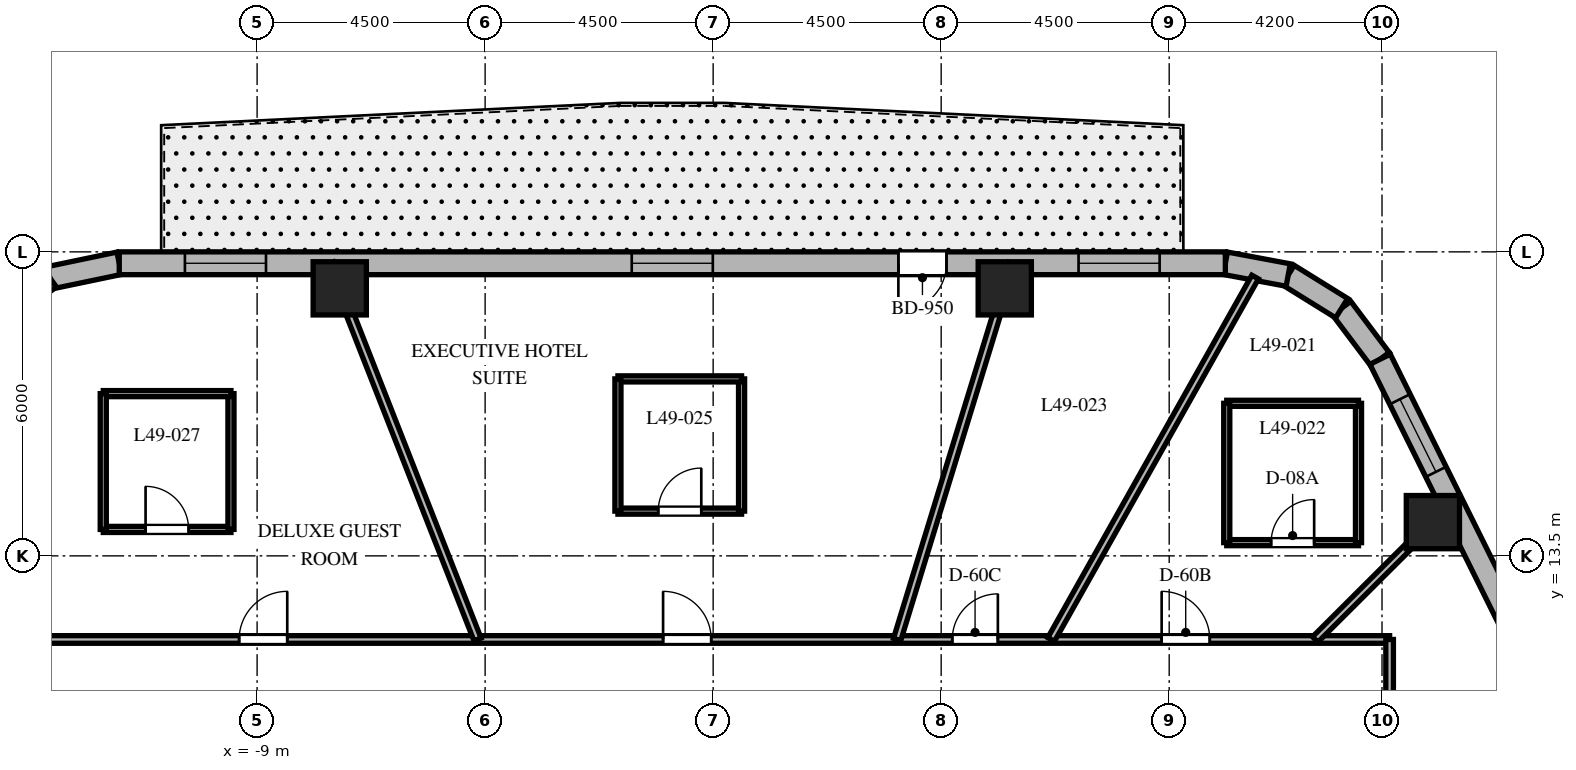
"""IFC4 building model, lengths in metres.
Left out: names, types, materials, properties, quantities, classifications, styles, units other than length and angle.
Written with IfcOpenShell. Run it as: python <this file> out.ifc"""

import sys

from ifc_helpers import new_model, si_unit, direction, frame, frame_2d, origin, origin_2d, place, context, subcontext, project, spatial, rectangle, extrude, element, fill, save


model = new_model("IFC4")
c1 = context("Model", 3, precision=1e-05, world=origin(), true_north=direction((0.0, 1.0)))
c2 = subcontext(c1, "Body", "Model", "MODEL_VIEW")
j1 = project(units=[si_unit("LENGTHUNIT", "METRE"), si_unit("PLANEANGLEUNIT", "RADIAN")], contexts=[c1])
p1 = place(None, origin())
s1 = spatial("IfcSite", under=j1, at=p1, CompositionType="ELEMENT")
p2 = place(p1, origin())
s2 = spatial("IfcBuilding", under=s1, at=p2, CompositionType="ELEMENT")
p3 = place(p2, frame((0.0, 0.0, 197.8)))
s3 = spatial("IfcBuildingStorey", under=s2, at=p3, CompositionType="ELEMENT", Elevation=197.8)
for number, where, z_axis, x_axis in (
    (1, (14.204, 14.166, 0.0), (0.0, 0.0, 1.0), (1.0, 0.0, 0.0)),
    (2, (5.755, 18.78, 0.0), (0.0, 0.0, 1.0), (1.0, 0.0, 0.0)),
    (3, (-7.369, 18.78, 0.0), (0.0, 0.0, 1.0), (1.0, 0.0, 0.0)),
):
    element("IfcColumn", number, at=place(p3, frame(where, z_axis=z_axis, x_axis=x_axis)), inside=s3, PredefinedType="COLUMN", context=c2, shape_type="SweptSolid", body=[
        extrude(rectangle(XDim=1.05, YDim=1.05, at=origin_2d()), origin(), (0.0, 0.0, 1.0), 3.7),
    ])
p4 = place(p3, frame((13.162, 17.381, 0.0), z_axis=(0.0, 0.0, 1.0), x_axis=(-0.601515770517, 0.798860925205, 0.0)))
e4 = element("IfcWall", 4, at=p4, inside=s3, PredefinedType="SOLIDWALL", context=c2, shape_type="SweptSolid", body=[
    extrude(rectangle(XDim=1.262, YDim=0.45, at=frame_2d((0.631, 0.0))), origin(), (0.0, 0.0, 1.0), 3.35),
])
p5 = place(p3, frame((12.403, 18.389, 0.0), z_axis=(0.0, 0.0, 1.0), x_axis=(-0.849795170926, 0.527113049991, 0.0)))
e5 = element("IfcWall", 5, at=p5, inside=s3, PredefinedType="SOLIDWALL", context=c2, shape_type="SweptSolid", body=[
    extrude(rectangle(XDim=1.241, YDim=0.45, at=frame_2d((0.62, 0.0))), origin(), (0.0, 0.0, 1.0), 3.35),
])
p6 = place(p3, frame((11.349, 19.043, 0.0), z_axis=(0.0, 0.0, 1.0), x_axis=(-0.982931267051, 0.183973161772, 0.0)))
e6 = element("IfcWall", 6, at=p6, inside=s3, PredefinedType="SOLIDWALL", context=c2, shape_type="SweptSolid", body=[
    extrude(rectangle(XDim=1.262, YDim=0.45, at=frame_2d((0.631, 0.0))), origin(), (0.0, 0.0, 1.0), 3.35),
])
p7 = place(p3, frame((-11.72, 19.275, 0.0), z_axis=(0.0, 0.0, 1.0), x_axis=(-0.97893106758, -0.204191001093, 0.0)))
e7 = element("IfcWall", 7, at=p7, inside=s3, PredefinedType="SOLIDWALL", context=c2, shape_type="SweptSolid", body=[
    extrude(rectangle(XDim=1.4, YDim=0.45, at=frame_2d((0.7, 0.0))), origin(), (0.0, 0.0, 1.0), 3.35),
])
p8 = place(p3, frame((-13.091, 18.989, 0.0), z_axis=(0.0, 0.0, 1.0), x_axis=(-0.815574637848, -0.578651890258, 0.0)))
e8 = element("IfcWall", 8, at=p8, inside=s3, PredefinedType="SOLIDWALL", context=c2, shape_type="SweptSolid", body=[
    extrude(rectangle(XDim=1.377, YDim=0.45, at=frame_2d((0.688, 0.0))), origin(), (0.0, 0.0, 1.0), 3.35),
])
p9 = place(p3, frame((20.618, 2.344, 0.0), z_axis=(0.0, 0.0, 1.0), x_axis=(-0.444243691097, 0.895905990002, 0.0)))
e9 = element("IfcWall", 9, at=p9, inside=s3, PredefinedType="SOLIDWALL", context=c2, shape_type="SweptSolid", body=[
    extrude(rectangle(XDim=16.784, YDim=0.45, at=frame_2d((8.392, 0.0))), origin(), (0.0, 0.0, 1.0), 3.35),
])
p10 = place(p9, frame((0.931, 0.0, 0.8)))
e10 = element("IfcOpeningElement", 10, at=p10, cuts=e9, PredefinedType="OPENING", context=c2, shape_type="SweptSolid", body=[
    extrude(rectangle(XDim=1.6, YDim=1.75, at=frame_2d((0.8, 0.875))), frame((0.0, 0.235, 0.0), z_axis=(0.0, -1.0, 0.0), x_axis=(1.0, 0.0, 0.0)), (0.0, 0.0, 1.0), 0.47),
])
p11 = place(p9, frame((7.642, 0.0, 0.8)))
e11 = element("IfcOpeningElement", 11, at=p11, cuts=e9, PredefinedType="OPENING", context=c2, shape_type="SweptSolid", body=[
    extrude(rectangle(XDim=1.6, YDim=1.75, at=frame_2d((0.8, 0.875))), frame((0.0, 0.235, 0.0), z_axis=(0.0, -1.0, 0.0), x_axis=(1.0, 0.0, 0.0)), (0.0, 0.0, 1.0), 0.47),
])
p12 = place(p9, frame((14.303, 0.0, 0.8)))
e12 = element("IfcOpeningElement", 12, at=p12, cuts=e9, PredefinedType="OPENING", context=c2, shape_type="SweptSolid", body=[
    extrude(rectangle(XDim=1.6, YDim=1.75, at=frame_2d((0.8, 0.875))), frame((0.0, 0.235, 0.0), z_axis=(0.0, -1.0, 0.0), x_axis=(1.0, 0.0, 0.0)), (0.0, 0.0, 1.0), 0.47),
])
p13 = place(p3, frame((10.108, 19.275, 0.0), z_axis=(0.0, 0.0, 1.0), x_axis=(-1.0, 0.0, 0.0)))
e13 = element("IfcWall", 13, at=p13, inside=s3, PredefinedType="SOLIDWALL", context=c2, shape_type="SweptSolid", body=[
    extrude(rectangle(XDim=21.829, YDim=0.45, at=frame_2d((10.915, 0.0))), origin(), (0.0, 0.0, 1.0), 3.35),
])
p14 = place(p13, frame((5.503, 0.0, 0.0)))
e14 = element("IfcOpeningElement", 14, at=p14, cuts=e13, PredefinedType="OPENING", context=c2, shape_type="SweptSolid", body=[
    extrude(rectangle(XDim=0.95, YDim=2.15, at=frame_2d((0.475, 1.075))), frame((0.0, 0.235, 0.0), z_axis=(0.0, -1.0, 0.0), x_axis=(1.0, 0.0, 0.0)), (0.0, 0.0, 1.0), 0.47),
])
p15 = place(p13, frame((1.297, 0.0, 0.8)))
e15 = element("IfcOpeningElement", 15, at=p15, cuts=e13, PredefinedType="OPENING", context=c2, shape_type="SweptSolid", body=[
    extrude(rectangle(XDim=1.6, YDim=1.75, at=frame_2d((0.8, 0.875))), frame((0.0, 0.235, 0.0), z_axis=(0.0, -1.0, 0.0), x_axis=(1.0, 0.0, 0.0)), (0.0, 0.0, 1.0), 0.47),
])
p16 = place(p13, frame((10.115, 0.0, 0.8)))
e16 = element("IfcOpeningElement", 16, at=p16, cuts=e13, PredefinedType="OPENING", context=c2, shape_type="SweptSolid", body=[
    extrude(rectangle(XDim=1.6, YDim=1.75, at=frame_2d((0.8, 0.875))), frame((0.0, 0.235, 0.0), z_axis=(0.0, -1.0, 0.0), x_axis=(1.0, 0.0, 0.0)), (0.0, 0.0, 1.0), 0.47),
])
p17 = place(p13, frame((18.933, 0.0, 0.8)))
e17 = element("IfcOpeningElement", 17, at=p17, cuts=e13, PredefinedType="OPENING", context=c2, shape_type="SweptSolid", body=[
    extrude(rectangle(XDim=1.6, YDim=1.75, at=frame_2d((0.8, 0.875))), frame((0.0, 0.235, 0.0), z_axis=(0.0, -1.0, 0.0), x_axis=(1.0, 0.0, 0.0)), (0.0, 0.0, 1.0), 0.47),
])
p18 = place(p3, frame((-13.35, 11.85, 0.0), z_axis=(0.0, 0.0, 1.0), x_axis=(1.0, 0.0, 0.0)))
e18 = element("IfcWall", 18, at=p18, inside=s3, PredefinedType="PARTITIONING", context=c2, shape_type="SweptSolid", body=[
    extrude(rectangle(XDim=26.7, YDim=0.15, at=frame_2d((13.35, 0.0))), origin(), (0.0, 0.0, 1.0), 2.79),
])
p19 = place(p18, frame((22.201, 0.0, 0.0)))
e19 = element("IfcOpeningElement", 19, at=p19, cuts=e18, PredefinedType="OPENING", context=c2, shape_type="SweptSolid", body=[
    extrude(rectangle(XDim=0.95, YDim=2.03, at=frame_2d((0.475, 1.015))), frame((0.0, 0.085, 0.0), z_axis=(0.0, -1.0, 0.0), x_axis=(1.0, 0.0, 0.0)), (0.0, 0.0, 1.0), 0.17),
])
p20 = place(p18, frame((18.069, 0.0, 0.0)))
e20 = element("IfcOpeningElement", 20, at=p20, cuts=e18, PredefinedType="OPENING", context=c2, shape_type="SweptSolid", body=[
    extrude(rectangle(XDim=0.9, YDim=2.03, at=frame_2d((0.45, 1.015))), frame((0.0, 0.085, 0.0), z_axis=(0.0, -1.0, 0.0), x_axis=(1.0, 0.0, 0.0)), (0.0, 0.0, 1.0), 0.17),
])
p21 = place(p18, frame((12.362, 0.0, 0.0)))
e21 = element("IfcOpeningElement", 21, at=p21, cuts=e18, PredefinedType="OPENING", context=c2, shape_type="SweptSolid", body=[
    extrude(rectangle(XDim=0.95, YDim=2.03, at=frame_2d((0.475, 1.015))), frame((0.0, 0.085, 0.0), z_axis=(0.0, -1.0, 0.0), x_axis=(1.0, 0.0, 0.0)), (0.0, 0.0, 1.0), 0.17),
])
p22 = place(p18, frame((3.995, 0.0, 0.0)))
e22 = element("IfcOpeningElement", 22, at=p22, cuts=e18, PredefinedType="OPENING", context=c2, shape_type="SweptSolid", body=[
    extrude(rectangle(XDim=0.95, YDim=2.03, at=frame_2d((0.475, 1.015))), frame((0.0, 0.085, 0.0), z_axis=(0.0, -1.0, 0.0), x_axis=(1.0, 0.0, 0.0)), (0.0, 0.0, 1.0), 0.17),
])
p23 = place(p3, frame((13.35, 11.85, 0.0), z_axis=(0.0, 0.0, 1.0), x_axis=(0.0, -1.0, 0.0)))
e23 = element("IfcWall", 23, at=p23, inside=s3, PredefinedType="PARTITIONING", context=c2, shape_type="SweptSolid", body=[
    extrude(rectangle(XDim=23.7, YDim=0.15, at=frame_2d((11.85, 0.0))), origin(), (0.0, 0.0, 1.0), 2.79),
])
p24 = place(p23, frame((9.424, 0.0, 0.0)))
e24 = element("IfcOpeningElement", 24, at=p24, cuts=e23, PredefinedType="OPENING", context=c2, shape_type="SweptSolid", body=[
    extrude(rectangle(XDim=0.95, YDim=2.03, at=frame_2d((0.475, 1.015))), frame((0.0, 0.085, 0.0), z_axis=(0.0, -1.0, 0.0), x_axis=(1.0, 0.0, 0.0)), (0.0, 0.0, 1.0), 0.17),
])
p25 = place(p23, frame((3.765, 0.0, 0.0)))
e25 = element("IfcOpeningElement", 25, at=p25, cuts=e23, PredefinedType="OPENING", context=c2, shape_type="SweptSolid", body=[
    extrude(rectangle(XDim=0.9, YDim=2.03, at=frame_2d((0.45, 1.015))), frame((0.0, 0.085, 0.0), z_axis=(0.0, -1.0, 0.0), x_axis=(1.0, 0.0, 0.0)), (0.0, 0.0, 1.0), 0.17),
])
p26 = place(p23, frame((12.494, 0.0, 0.0)))
e26 = element("IfcOpeningElement", 26, at=p26, cuts=e23, PredefinedType="OPENING", context=c2, shape_type="SweptSolid", body=[
    extrude(rectangle(XDim=0.9, YDim=2.03, at=frame_2d((0.45, 1.015))), frame((0.0, 0.085, 0.0), z_axis=(0.0, -1.0, 0.0), x_axis=(1.0, 0.0, 0.0)), (0.0, 0.0, 1.0), 0.17),
])
p27 = place(p3, frame((11.882, 11.85, 0.0), z_axis=(0.0, 0.0, 1.0), x_axis=(0.708037373639, 0.706174962407, 0.0)))
e27 = element("IfcWall", 27, at=p27, inside=s3, PredefinedType="PARTITIONING", context=c2, shape_type="SweptSolid", body=[
    extrude(rectangle(XDim=3.802, YDim=0.15, at=frame_2d((1.901, 0.0))), origin(), (0.0, 0.0, 1.0), 2.59),
])
p28 = place(p3, frame((6.67, 11.85, 0.0), z_axis=(0.0, 0.0, 1.0), x_axis=(0.490522493943, 0.871428530022, 0.0)))
e28 = element("IfcWall", 28, at=p28, inside=s3, PredefinedType="PARTITIONING", context=c2, shape_type="SweptSolid", body=[
    extrude(rectangle(XDim=8.207, YDim=0.15, at=frame_2d((4.104, 0.0))), origin(), (0.0, 0.0, 1.0), 2.59),
])
p29 = place(p3, frame((3.631, 11.85, 0.0), z_axis=(0.0, 0.0, 1.0), x_axis=(0.293007573338, 0.956110120209, 0.0)))
e29 = element("IfcWall", 29, at=p29, inside=s3, PredefinedType="PARTITIONING", context=c2, shape_type="SweptSolid", body=[
    extrude(rectangle(XDim=7.766, YDim=0.15, at=frame_2d((3.883, 0.0))), origin(), (0.0, 0.0, 1.0), 2.59),
])
p30 = place(p3, frame((-4.65, 11.85, 0.0), z_axis=(0.0, 0.0, 1.0), x_axis=(-0.365265947993, 0.930903210456, 0.0)))
e30 = element("IfcWall", 30, at=p30, inside=s3, PredefinedType="PARTITIONING", context=c2, shape_type="SweptSolid", body=[
    extrude(rectangle(XDim=7.976, YDim=0.15, at=frame_2d((3.988, 0.0))), origin(), (0.0, 0.0, 1.0), 2.59),
])
p31 = place(p3, frame((10.136, 13.761, 0.0), z_axis=(0.0, 0.0, 1.0), x_axis=(1.0, 0.0, 0.0)))
e31 = element("IfcWall", 31, at=p31, inside=s3, PredefinedType="PARTITIONING", context=c2, shape_type="SweptSolid", body=[
    extrude(rectangle(XDim=2.6, YDim=0.12, at=frame_2d((1.3, 0.0))), origin(), (0.0, 0.0, 1.0), 3.35),
])
p32 = place(p31, frame((0.875, 0.0, 0.0)))
e32 = element("IfcOpeningElement", 32, at=p32, cuts=e31, PredefinedType="OPENING", context=c2, shape_type="SweptSolid", body=[
    extrude(rectangle(XDim=0.85, YDim=2.03, at=frame_2d((0.425, 1.015))), frame((0.0, 0.07, 0.0), z_axis=(0.0, -1.0, 0.0), x_axis=(1.0, 0.0, 0.0)), (0.0, 0.0, 1.0), 0.14),
])
p33 = place(p3, frame((12.736, 13.761, 0.0), z_axis=(0.0, 0.0, 1.0), x_axis=(0.0, 1.0, 0.0)))
e33 = element("IfcWall", 33, at=p33, inside=s3, PredefinedType="PARTITIONING", context=c2, shape_type="SweptSolid", body=[
    extrude(rectangle(XDim=2.75, YDim=0.12, at=frame_2d((1.375, 0.0))), origin(), (0.0, 0.0, 1.0), 2.59),
])
p34 = place(p3, frame((12.736, 16.511, 0.0), z_axis=(0.0, 0.0, 1.0), x_axis=(-1.0, 0.0, 0.0)))
e34 = element("IfcWall", 34, at=p34, inside=s3, PredefinedType="PARTITIONING", context=c2, shape_type="SweptSolid", body=[
    extrude(rectangle(XDim=2.6, YDim=0.12, at=frame_2d((1.3, 0.0))), origin(), (0.0, 0.0, 1.0), 2.59),
])
p35 = place(p3, frame((10.136, 16.511, 0.0), z_axis=(0.0, 0.0, 1.0), x_axis=(0.0, -1.0, 0.0)))
e35 = element("IfcWall", 35, at=p35, inside=s3, PredefinedType="PARTITIONING", context=c2, shape_type="SweptSolid", body=[
    extrude(rectangle(XDim=2.75, YDim=0.12, at=frame_2d((1.375, 0.0))), origin(), (0.0, 0.0, 1.0), 2.59),
])
p36 = place(p3, frame((-1.879, 14.383, 0.0), z_axis=(0.0, 0.0, 1.0), x_axis=(1.0, 0.0, 0.0)))
e36 = element("IfcWall", 36, at=p36, inside=s3, PredefinedType="PARTITIONING", context=c2, shape_type="SweptSolid", body=[
    extrude(rectangle(XDim=2.44, YDim=0.12, at=frame_2d((1.22, 0.0))), origin(), (0.0, 0.0, 1.0), 3.35),
])
p37 = place(p36, frame((0.795, 0.0, 0.0)))
e37 = element("IfcOpeningElement", 37, at=p37, cuts=e36, PredefinedType="OPENING", context=c2, shape_type="SweptSolid", body=[
    extrude(rectangle(XDim=0.85, YDim=2.03, at=frame_2d((0.425, 1.015))), frame((0.0, 0.07, 0.0), z_axis=(0.0, -1.0, 0.0), x_axis=(1.0, 0.0, 0.0)), (0.0, 0.0, 1.0), 0.14),
])
p38 = place(p3, frame((0.561, 14.383, 0.0), z_axis=(0.0, 0.0, 1.0), x_axis=(0.0, 1.0, 0.0)))
e38 = element("IfcWall", 38, at=p38, inside=s3, PredefinedType="PARTITIONING", context=c2, shape_type="SweptSolid", body=[
    extrude(rectangle(XDim=2.61, YDim=0.12, at=frame_2d((1.305, 0.0))), origin(), (0.0, 0.0, 1.0), 2.791),
])
p39 = place(p3, frame((0.561, 16.993, 0.0), z_axis=(0.0, 0.0, 1.0), x_axis=(-1.0, 0.0, 0.0)))
e39 = element("IfcWall", 39, at=p39, inside=s3, PredefinedType="PARTITIONING", context=c2, shape_type="SweptSolid", body=[
    extrude(rectangle(XDim=2.44, YDim=0.12, at=frame_2d((1.22, 0.0))), origin(), (0.0, 0.0, 1.0), 3.35),
])
p40 = place(p3, frame((-1.879, 16.993, 0.0), z_axis=(0.0, 0.0, 1.0), x_axis=(0.0, -1.0, 0.0)))
e40 = element("IfcWall", 40, at=p40, inside=s3, PredefinedType="PARTITIONING", context=c2, shape_type="SweptSolid", body=[
    extrude(rectangle(XDim=2.61, YDim=0.12, at=frame_2d((1.305, 0.0))), origin(), (0.0, 0.0, 1.0), 2.791),
])
p41 = place(p3, frame((-12.036, 14.022, 0.0), z_axis=(0.0, 0.0, 1.0), x_axis=(1.0, 0.0, 0.0)))
e41 = element("IfcWall", 41, at=p41, inside=s3, PredefinedType="PARTITIONING", context=c2, shape_type="SweptSolid", body=[
    extrude(rectangle(XDim=2.52, YDim=0.12, at=frame_2d((1.26, 0.0))), origin(), (0.0, 0.0, 1.0), 2.876),
])
p42 = place(p41, frame((0.835, 0.0, 0.0)))
e42 = element("IfcOpeningElement", 42, at=p42, cuts=e41, PredefinedType="OPENING", context=c2, shape_type="SweptSolid", body=[
    extrude(rectangle(XDim=0.85, YDim=2.03, at=frame_2d((0.425, 1.015))), frame((0.0, 0.07, 0.0), z_axis=(0.0, -1.0, 0.0), x_axis=(1.0, 0.0, 0.0)), (0.0, 0.0, 1.0), 0.14),
])
p43 = place(p3, frame((-9.516, 14.022, 0.0), z_axis=(0.0, 0.0, 1.0), x_axis=(0.0, 1.0, 0.0)))
e43 = element("IfcWall", 43, at=p43, inside=s3, PredefinedType="PARTITIONING", context=c2, shape_type="SweptSolid", body=[
    extrude(rectangle(XDim=2.68, YDim=0.12, at=frame_2d((1.34, 0.0))), origin(), (0.0, 0.0, 1.0), 2.876),
])
p44 = place(p3, frame((-9.516, 16.702, 0.0), z_axis=(0.0, 0.0, 1.0), x_axis=(-1.0, 0.0, 0.0)))
e44 = element("IfcWall", 44, at=p44, inside=s3, PredefinedType="PARTITIONING", context=c2, shape_type="SweptSolid", body=[
    extrude(rectangle(XDim=2.52, YDim=0.12, at=frame_2d((1.26, 0.0))), origin(), (0.0, 0.0, 1.0), 2.59),
])
p45 = place(p3, frame((-12.036, 16.702, 0.0), z_axis=(0.0, 0.0, 1.0), x_axis=(0.0, -1.0, 0.0)))
e45 = element("IfcWall", 45, at=p45, inside=s3, PredefinedType="PARTITIONING", context=c2, shape_type="SweptSolid", body=[
    extrude(rectangle(XDim=2.68, YDim=0.12, at=frame_2d((1.34, 0.0))), origin(), (0.0, 0.0, 1.0), 2.59),
])
p46 = place(p12, origin())
e46 = element("IfcWindow", 46, at=p46, inside=s3, PartitioningType="SINGLE_PANEL", PredefinedType="WINDOW", context=c2, shape_type="SweptSolid", body=[
    extrude(rectangle(XDim=1.6, YDim=1.75, at=frame_2d((0.8, 0.875))), frame((0.0, 0.03, 0.0), z_axis=(0.0, -1.0, 0.0), x_axis=(1.0, 0.0, 0.0)), (0.0, 0.0, 1.0), 0.06),
])
fill(e12, e46)
p47 = place(p14, origin())
e47 = element("IfcDoor", 47, at=p47, inside=s3, OperationType="SINGLE_SWING_RIGHT", PredefinedType="DOOR", context=c2, shape_type="SweptSolid", body=[
    extrude(rectangle(XDim=0.95, YDim=2.15, at=frame_2d((0.475, 1.075))), frame((0.0, 0.025, 0.0), z_axis=(0.0, -1.0, 0.0), x_axis=(1.0, 0.0, 0.0)), (0.0, 0.0, 1.0), 0.05),
])
fill(e14, e47)
p48 = place(p15, origin())
e48 = element("IfcWindow", 48, at=p48, inside=s3, PartitioningType="SINGLE_PANEL", PredefinedType="WINDOW", context=c2, shape_type="SweptSolid", body=[
    extrude(rectangle(XDim=1.6, YDim=1.75, at=frame_2d((0.8, 0.875))), frame((0.0, 0.03, 0.0), z_axis=(0.0, -1.0, 0.0), x_axis=(1.0, 0.0, 0.0)), (0.0, 0.0, 1.0), 0.06),
])
fill(e15, e48)
p49 = place(p16, origin())
e49 = element("IfcWindow", 49, at=p49, inside=s3, PartitioningType="SINGLE_PANEL", PredefinedType="WINDOW", context=c2, shape_type="SweptSolid", body=[
    extrude(rectangle(XDim=1.6, YDim=1.75, at=frame_2d((0.8, 0.875))), frame((0.0, 0.03, 0.0), z_axis=(0.0, -1.0, 0.0), x_axis=(1.0, 0.0, 0.0)), (0.0, 0.0, 1.0), 0.06),
])
fill(e16, e49)
p50 = place(p17, origin())
e50 = element("IfcWindow", 50, at=p50, inside=s3, PartitioningType="SINGLE_PANEL", PredefinedType="WINDOW", context=c2, shape_type="SweptSolid", body=[
    extrude(rectangle(XDim=1.6, YDim=1.75, at=frame_2d((0.8, 0.875))), frame((0.0, 0.03, 0.0), z_axis=(0.0, -1.0, 0.0), x_axis=(1.0, 0.0, 0.0)), (0.0, 0.0, 1.0), 0.06),
])
fill(e17, e50)
p51 = place(p19, origin())
e51 = element("IfcDoor", 51, at=p51, inside=s3, OperationType="SINGLE_SWING_LEFT", PredefinedType="DOOR", context=c2, shape_type="SweptSolid", body=[
    extrude(rectangle(XDim=0.95, YDim=2.03, at=frame_2d((0.475, 1.015))), frame((0.0, 0.025, 0.0), z_axis=(0.0, -1.0, 0.0), x_axis=(1.0, 0.0, 0.0)), (0.0, 0.0, 1.0), 0.05),
])
fill(e19, e51)
p52 = place(p32, origin())
e52 = element("IfcDoor", 52, at=p52, inside=s3, OperationType="SINGLE_SWING_RIGHT", PredefinedType="DOOR", context=c2, shape_type="SweptSolid", body=[
    extrude(rectangle(XDim=0.85, YDim=2.03, at=frame_2d((0.425, 1.015))), frame((0.0, 0.025, 0.0), z_axis=(0.0, -1.0, 0.0), x_axis=(1.0, 0.0, 0.0)), (0.0, 0.0, 1.0), 0.05),
])
fill(e32, e52)
p53 = place(p20, origin())
e53 = element("IfcDoor", 53, at=p53, inside=s3, OperationType="SINGLE_SWING_RIGHT", PredefinedType="DOOR", context=c2, shape_type="SweptSolid", body=[
    extrude(rectangle(XDim=0.9, YDim=2.03, at=frame_2d((0.45, 1.015))), frame((0.0, 0.025, 0.0), z_axis=(0.0, -1.0, 0.0), x_axis=(1.0, 0.0, 0.0)), (0.0, 0.0, 1.0), 0.05),
])
fill(e20, e53)
p54 = place(p21, origin())
e54 = element("IfcDoor", 54, at=p54, inside=s3, OperationType="SINGLE_SWING_LEFT", PredefinedType="DOOR", context=c2, shape_type="SweptSolid", body=[
    extrude(rectangle(XDim=0.95, YDim=2.03, at=frame_2d((0.475, 1.015))), frame((0.0, 0.025, 0.0), z_axis=(0.0, -1.0, 0.0), x_axis=(1.0, 0.0, 0.0)), (0.0, 0.0, 1.0), 0.05),
])
fill(e21, e54)
p55 = place(p37, origin())
e55 = element("IfcDoor", 55, at=p55, inside=s3, OperationType="SINGLE_SWING_RIGHT", PredefinedType="DOOR", context=c2, shape_type="SweptSolid", body=[
    extrude(rectangle(XDim=0.85, YDim=2.03, at=frame_2d((0.425, 1.015))), frame((0.0, 0.025, 0.0), z_axis=(0.0, -1.0, 0.0), x_axis=(1.0, 0.0, 0.0)), (0.0, 0.0, 1.0), 0.05),
])
fill(e37, e55)
p56 = place(p22, origin())
e56 = element("IfcDoor", 56, at=p56, inside=s3, OperationType="SINGLE_SWING_RIGHT", PredefinedType="DOOR", context=c2, shape_type="SweptSolid", body=[
    extrude(rectangle(XDim=0.95, YDim=2.03, at=frame_2d((0.475, 1.015))), frame((0.0, 0.025, 0.0), z_axis=(0.0, -1.0, 0.0), x_axis=(1.0, 0.0, 0.0)), (0.0, 0.0, 1.0), 0.05),
])
fill(e22, e56)
p57 = place(p42, origin())
e57 = element("IfcDoor", 57, at=p57, inside=s3, OperationType="SINGLE_SWING_LEFT", PredefinedType="DOOR", context=c2, shape_type="SweptSolid", body=[
    extrude(rectangle(XDim=0.85, YDim=2.03, at=frame_2d((0.425, 1.015))), frame((0.0, 0.025, 0.0), z_axis=(0.0, -1.0, 0.0), x_axis=(1.0, 0.0, 0.0)), (0.0, 0.0, 1.0), 0.05),
])
fill(e42, e57)
save(model, sys.argv[1])
